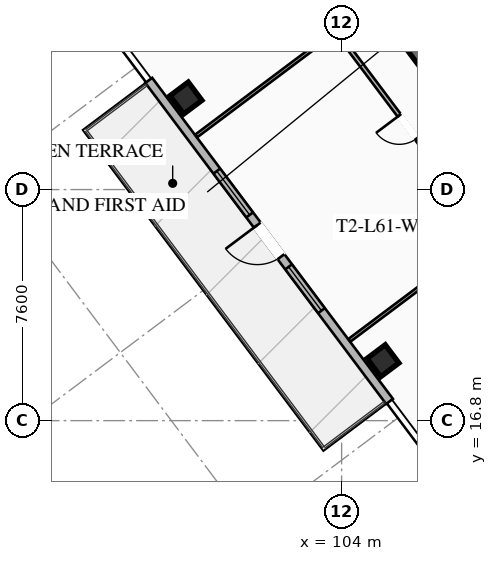
"""IFC4 building model, lengths in metres.
Left out: names, types, materials, properties, quantities, classifications, styles, units other than length and angle.
Written with IfcOpenShell. Run it as: python <this file> out.ifc"""

import sys

from ifc_helpers import new_model, si_unit, direction, frame, frame_2d, origin, origin_2d, place, context, subcontext, project, spatial, rectangle, hollow_rectangle, extrude, element, fill, save


model = new_model("IFC4")
c1 = context("Model", 3, precision=1e-05, world=origin(), true_north=direction((0.0, 1.0)))
c2 = subcontext(c1, "Body", "Model", "MODEL_VIEW")
j1 = project(units=[si_unit("LENGTHUNIT", "METRE"), si_unit("PLANEANGLEUNIT", "RADIAN")], contexts=[c1])
p1 = place(None, origin())
s1 = spatial("IfcSite", under=j1, at=p1, CompositionType="ELEMENT")
p2 = place(p1, origin())
s2 = spatial("IfcBuilding", under=s1, at=p2, CompositionType="ELEMENT")
p3 = place(p2, frame((0.0, 0.0, 225.5)))
s3 = spatial("IfcBuildingStorey", under=s2, at=p3, CompositionType="ELEMENT", Elevation=225.5)
p4 = place(p3, frame((112.396, 21.047, 0.0), z_axis=(0.0, 0.0, 1.0), x_axis=(-0.600005007985, 0.799996243986, 0.0)))
e1 = element("IfcWall", 1, at=p4, inside=s3, PredefinedType="SHEAR", context=c2, shape_type="SweptSolid", body=[
    extrude(rectangle(XDim=15.6, YDim=0.45, at=frame_2d((7.8, 0.0))), origin(), (0.0, 0.0, 1.0), 3.55),
])
for number, where, z_axis, x_axis in (
    (2, (98.88, 27.41, 0.0), (0.0, 0.0, 1.0), (0.8, 0.6, 0.0)),
    (3, (105.36, 18.77, 0.0), (0.0, 0.0, 1.0), (0.8, 0.6, 0.0)),
):
    element("IfcColumn", number, at=place(p3, frame(where, z_axis=z_axis, x_axis=x_axis)), inside=s3, PredefinedType="COLUMN", context=c2, shape_type="SweptSolid", body=[
        extrude(hollow_rectangle(XDim=0.75, YDim=0.75, WallThickness=0.032, at=origin_2d()), origin(), (0.0, 0.0, 1.0), 3.37),
    ])
p5 = place(p3, frame((105.576, 17.432, 0.0), z_axis=(0.0, 0.0, 1.0), x_axis=(-0.599994081423, 0.800004438899, 0.0)))
e4 = element("IfcWall", 4, at=p5, inside=s3, PredefinedType="SOLIDWALL", context=c2, shape_type="SweptSolid", body=[
    extrude(rectangle(XDim=13.2, YDim=0.28, at=frame_2d((6.6, 0.0))), origin(), (0.0, 0.0, 1.0), 3.37),
])
p6 = place(p5, frame((5.95, 0.0, 0.0)))
e5 = element("IfcOpeningElement", 5, at=p6, cuts=e4, PredefinedType="OPENING", context=c2, shape_type="SweptSolid", body=[
    extrude(rectangle(XDim=1.3, YDim=2.15, at=frame_2d((0.65, 1.075))), frame((0.0, 0.15, 0.0), z_axis=(0.0, -1.0, 0.0), x_axis=(1.0, 0.0, 0.0)), (0.0, 0.0, 1.0), 0.3),
])
p7 = place(p5, frame((3.732, 0.0, 0.85)))
e6 = element("IfcOpeningElement", 6, at=p7, cuts=e4, PredefinedType="OPENING", context=c2, shape_type="SweptSolid", body=[
    extrude(rectangle(XDim=1.8, YDim=1.92, at=frame_2d((0.9, 0.96))), frame((0.0, 0.15, 0.0), z_axis=(0.0, -1.0, 0.0), x_axis=(1.0, 0.0, 0.0)), (0.0, 0.0, 1.0), 0.3),
])
p8 = place(p5, frame((7.668, 0.0, 0.85)))
e7 = element("IfcOpeningElement", 7, at=p8, cuts=e4, PredefinedType="OPENING", context=c2, shape_type="SweptSolid", body=[
    extrude(rectangle(XDim=1.8, YDim=1.92, at=frame_2d((0.9, 0.96))), frame((0.0, 0.15, 0.0), z_axis=(0.0, -1.0, 0.0), x_axis=(1.0, 0.0, 0.0)), (0.0, 0.0, 1.0), 0.3),
])
p9 = place(p3, frame((113.23, 17.06, 0.0), z_axis=(0.0, 0.0, 1.0), x_axis=(-0.600003772342, 0.79999717073, 0.0)))
e8 = element("IfcWall", 8, at=p9, inside=s3, PredefinedType="PARTITIONING", context=c2, shape_type="SweptSolid", body=[
    extrude(rectangle(XDim=20.71, YDim=0.135, at=frame_2d((10.355, 0.0))), origin(), (0.0, 0.0, 1.0), 2.723),
])
p10 = place(p9, frame((0.3, 0.0, 0.0)))
e9 = element("IfcOpeningElement", 9, at=p10, cuts=e8, PredefinedType="OPENING", context=c2, shape_type="SweptSolid", body=[
    extrude(rectangle(XDim=0.95, YDim=2.05, at=frame_2d((0.475, 1.025))), frame((0.0, 0.077, 0.0), z_axis=(0.0, -1.0, 0.0), x_axis=(1.0, 0.0, 0.0)), (0.0, 0.0, 1.0), 0.155),
])
p11 = place(p9, frame((11.272, 0.0, 0.0)))
e10 = element("IfcOpeningElement", 10, at=p11, cuts=e8, PredefinedType="OPENING", context=c2, shape_type="SweptSolid", body=[
    extrude(rectangle(XDim=0.95, YDim=2.05, at=frame_2d((0.475, 1.025))), frame((0.0, 0.077, 0.0), z_axis=(0.0, -1.0, 0.0), x_axis=(1.0, 0.0, 0.0)), (0.0, 0.0, 1.0), 0.155),
])
p12 = place(p9, frame((19.46, 0.0, 0.0)))
e11 = element("IfcOpeningElement", 11, at=p12, cuts=e8, PredefinedType="OPENING", context=c2, shape_type="SweptSolid", body=[
    extrude(rectangle(XDim=0.95, YDim=2.05, at=frame_2d((0.475, 1.025))), frame((0.0, 0.077, 0.0), z_axis=(0.0, -1.0, 0.0), x_axis=(1.0, 0.0, 0.0)), (0.0, 0.0, 1.0), 0.155),
])
for number, where, z_axis, x_axis in (
    (12, (104.256, 19.442, 0.0), (0.0, 0.0, 1.0), (0.8, 0.6, 0.0)),
    (13, (99.216, 26.162, 0.0), (0.0, 0.0, 1.0), (0.8, 0.6, 0.0)),
):
    element("IfcWall", number, at=place(p3, frame(where, z_axis=z_axis, x_axis=x_axis)), inside=s3, PredefinedType="PARTITIONING", context=c2, shape_type="SweptSolid", body=[
        extrude(rectangle(XDim=5.67, YDim=0.11, at=frame_2d((2.835, 0.0))), origin(), (0.0, 0.0, 1.0), 2.723),
    ])
p13 = place(p6, origin())
e14 = element("IfcDoor", 14, at=p13, inside=s3, OperationType="SINGLE_SWING_RIGHT", PredefinedType="DOOR", context=c2, shape_type="SweptSolid", body=[
    extrude(rectangle(XDim=1.3, YDim=2.15, at=frame_2d((0.65, 1.075))), frame((0.0, 0.025, 0.0), z_axis=(0.0, -1.0, 0.0), x_axis=(1.0, 0.0, 0.0)), (0.0, 0.0, 1.0), 0.05),
])
fill(e5, e14)
p14 = place(p7, origin())
e15 = element("IfcWindow", 15, at=p14, inside=s3, PartitioningType="SINGLE_PANEL", PredefinedType="WINDOW", context=c2, shape_type="SweptSolid", body=[
    extrude(rectangle(XDim=1.8, YDim=1.92, at=frame_2d((0.9, 0.96))), frame((0.0, 0.03, 0.0), z_axis=(0.0, -1.0, 0.0), x_axis=(1.0, 0.0, 0.0)), (0.0, 0.0, 1.0), 0.06),
])
fill(e6, e15)
p15 = place(p8, origin())
e16 = element("IfcWindow", 16, at=p15, inside=s3, PartitioningType="SINGLE_PANEL", PredefinedType="WINDOW", context=c2, shape_type="SweptSolid", body=[
    extrude(rectangle(XDim=1.8, YDim=1.92, at=frame_2d((0.9, 0.96))), frame((0.0, 0.03, 0.0), z_axis=(0.0, -1.0, 0.0), x_axis=(1.0, 0.0, 0.0)), (0.0, 0.0, 1.0), 0.06),
])
fill(e7, e16)
p16 = place(p11, origin())
e17 = element("IfcDoor", 17, at=p16, inside=s3, OperationType="SINGLE_SWING_RIGHT", PredefinedType="DOOR", context=c2, shape_type="SweptSolid", body=[
    extrude(rectangle(XDim=0.95, YDim=2.05, at=frame_2d((0.475, 1.025))), frame((0.0, 0.025, 0.0), z_axis=(0.0, -1.0, 0.0), x_axis=(1.0, 0.0, 0.0)), (0.0, 0.0, 1.0), 0.05),
])
fill(e10, e17)
save(model, sys.argv[1])
